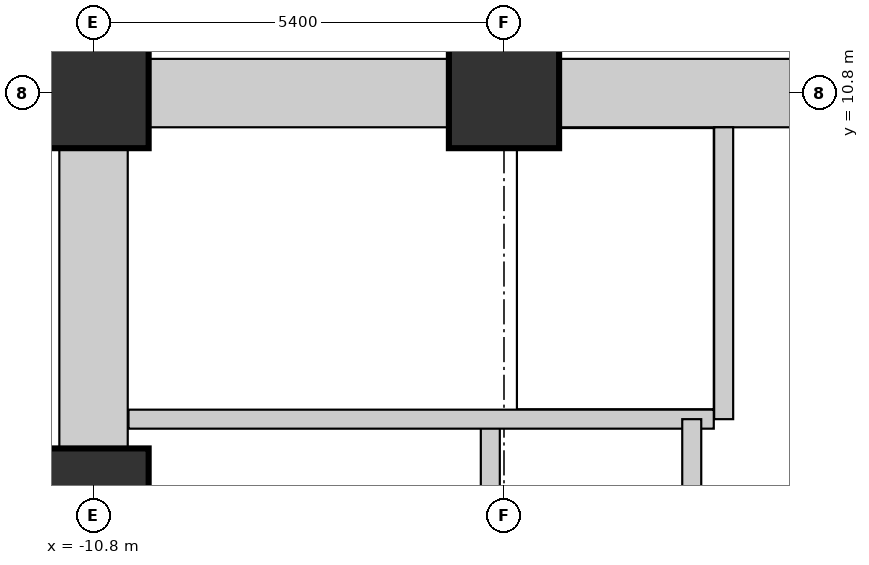
"""IFC4 building model, lengths in metres.
Left out: names, types, materials, properties, quantities, classifications, styles, units other than length and angle.
Written with IfcOpenShell. Run it as: python <this file> out.ifc"""

import sys

from ifc_helpers import new_model, si_unit, direction, frame, frame_2d, origin, origin_2d, place, context, subcontext, project, spatial, rectangle, extrude, element, fill, save


model = new_model("IFC4")
c1 = context("Model", 3, precision=1e-05, world=origin(), true_north=direction((0.0, 1.0)))
c2 = subcontext(c1, "Body", "Model", "MODEL_VIEW")
j1 = project(units=[si_unit("LENGTHUNIT", "METRE"), si_unit("PLANEANGLEUNIT", "RADIAN")], contexts=[c1])
p1 = place(None, origin())
s1 = spatial("IfcSite", under=j1, at=p1, CompositionType="ELEMENT")
p2 = place(p1, origin())
s2 = spatial("IfcBuilding", under=s1, at=p2, CompositionType="ELEMENT")
p3 = place(p2, frame((0.0, 0.0, 9.0)))
s3 = spatial("IfcBuildingStorey", under=s2, at=p3, CompositionType="ELEMENT", Elevation=9.0)
for number, where, z_axis, x_axis in (
    (1, (-10.8, 5.4, 0.0), (0.0, 0.0, 1.0), (1.0, 0.0, 0.0)),
    (2, (-10.8, 10.8, 0.0), (0.0, 0.0, 1.0), (1.0, 0.0, 0.0)),
    (3, (-5.4, 10.8, 0.0), (0.0, 0.0, 1.0), (1.0, 0.0, 0.0)),
):
    element("IfcColumn", number, at=place(p3, frame(where, z_axis=z_axis, x_axis=x_axis)), inside=s3, PredefinedType="COLUMN", context=c2, shape_type="SweptSolid", body=[
        extrude(rectangle(XDim=1.45, YDim=1.45, at=origin_2d()), origin(), (0.0, 0.0, 1.0), 4.5),
    ])
p4 = place(p3, frame((-10.065, 10.8, 0.0), z_axis=(0.0, 0.0, 1.0), x_axis=(1.0, 0.0, 0.0)))
e4 = element("IfcWall", 4, at=p4, inside=s3, PredefinedType="SHEAR", context=c2, shape_type="SweptSolid", body=[
    extrude(rectangle(XDim=3.93, YDim=0.9, at=frame_2d((1.965, 0.0))), origin(), (0.0, 0.0, 1.0), 4.5),
])
p5 = place(p3, frame((-4.665, 10.8, 0.0), z_axis=(0.0, 0.0, 1.0), x_axis=(1.0, 0.0, 0.0)))
e5 = element("IfcWall", 5, at=p5, inside=s3, PredefinedType="SHEAR", context=c2, shape_type="SweptSolid", body=[
    extrude(rectangle(XDim=3.93, YDim=0.9, at=frame_2d((1.965, 0.0))), origin(), (0.0, 0.0, 1.0), 4.5),
])
p6 = place(p5, frame((2.58, 0.0, 0.0)))
e6 = element("IfcOpeningElement", 6, at=p6, cuts=e5, PredefinedType="OPENING", context=c2, shape_type="SweptSolid", body=[
    extrude(rectangle(XDim=1.1, YDim=2.1, at=frame_2d((0.55, 1.05))), frame((0.0, 0.46, 0.0), z_axis=(0.0, -1.0, 0.0), x_axis=(1.0, 0.0, 0.0)), (0.0, 0.0, 1.0), 0.92),
])
p7 = place(p3, frame((-10.8, 6.135, 0.0), z_axis=(0.0, 0.0, 1.0), x_axis=(0.0, 1.0, 0.0)))
e7 = element("IfcWall", 7, at=p7, inside=s3, PredefinedType="SHEAR", context=c2, shape_type="SweptSolid", body=[
    extrude(rectangle(XDim=3.93, YDim=0.9, at=frame_2d((1.965, 0.0))), origin(), (0.0, 0.0, 1.0), 4.5),
])
p8 = place(p3, frame((-5.58, 0.72, 0.0), z_axis=(0.0, 0.0, 1.0), x_axis=(0.0, 1.0, 0.0)))
e8 = element("IfcWall", 8, at=p8, inside=s3, PredefinedType="SHEAR", context=c2, shape_type="SweptSolid", body=[
    extrude(rectangle(XDim=5.79, YDim=0.25, at=frame_2d((2.895, 0.0))), origin(), (0.0, 0.0, 1.0), 4.5),
])
p9 = place(p8, frame((3.35, 0.0, 0.0)))
e9 = element("IfcOpeningElement", 9, at=p9, cuts=e8, PredefinedType="OPENING", context=c2, shape_type="SweptSolid", body=[
    extrude(rectangle(XDim=1.1, YDim=2.1, at=frame_2d((0.55, 1.05))), frame((0.0, 0.135, 0.0), z_axis=(0.0, -1.0, 0.0), x_axis=(1.0, 0.0, 0.0)), (0.0, 0.0, 1.0), 0.27),
])
p10 = place(p3, frame((-2.51, 6.51, 0.0), z_axis=(0.0, 0.0, 1.0), x_axis=(0.0, 1.0, 0.0)))
e10 = element("IfcWall", 10, at=p10, inside=s3, PredefinedType="SHEAR", context=c2, shape_type="SweptSolid", body=[
    extrude(rectangle(XDim=3.84, YDim=0.25, at=frame_2d((1.92, 0.0))), origin(), (0.0, 0.0, 1.0), 4.5),
])
p11 = place(p3, frame((-10.34, 6.51, 0.0), z_axis=(0.0, 0.0, 1.0), x_axis=(1.0, 0.0, 0.0)))
e11 = element("IfcWall", 11, at=p11, inside=s3, PredefinedType="SHEAR", context=c2, shape_type="SweptSolid", body=[
    extrude(rectangle(XDim=7.7, YDim=0.25, at=frame_2d((3.85, 0.0))), origin(), (0.0, 0.0, 1.0), 4.5),
])
p12 = place(p11, frame((0.35, 0.0, 0.0)))
e12 = element("IfcOpeningElement", 12, at=p12, cuts=e11, PredefinedType="OPENING", context=c2, shape_type="SweptSolid", body=[
    extrude(rectangle(XDim=1.1, YDim=2.1, at=frame_2d((0.55, 1.05))), frame((0.0, 0.135, 0.0), z_axis=(0.0, -1.0, 0.0), x_axis=(1.0, 0.0, 0.0)), (0.0, 0.0, 1.0), 0.27),
])
p13 = place(p3, frame((-2.93, 0.68, 0.0), z_axis=(0.0, 0.0, 1.0), x_axis=(0.0, 1.0, 0.0)))
e13 = element("IfcWall", 13, at=p13, inside=s3, PredefinedType="SHEAR", context=c2, shape_type="SweptSolid", body=[
    extrude(rectangle(XDim=5.83, YDim=0.25, at=frame_2d((2.915, 0.0))), origin(), (0.0, 0.0, 1.0), 4.5),
])
p14 = place(p13, frame((0.75, 0.0, 0.0)))
e14 = element("IfcOpeningElement", 14, at=p14, cuts=e13, PredefinedType="OPENING", context=c2, shape_type="SweptSolid", body=[
    extrude(rectangle(XDim=1.2, YDim=2.1, at=frame_2d((0.6, 1.05))), frame((0.0, 0.135, 0.0), z_axis=(0.0, -1.0, 0.0), x_axis=(1.0, 0.0, 0.0)), (0.0, 0.0, 1.0), 0.27),
])
p15 = place(p12, origin())
e15 = element("IfcDoor", 15, at=p15, inside=s3, OperationType="SINGLE_SWING_LEFT", PredefinedType="DOOR", context=c2, shape_type="SweptSolid", body=[
    extrude(rectangle(XDim=1.1, YDim=2.1, at=frame_2d((0.55, 1.05))), frame((0.0, 0.025, 0.0), z_axis=(0.0, -1.0, 0.0), x_axis=(1.0, 0.0, 0.0)), (0.0, 0.0, 1.0), 0.05),
])
fill(e12, e15)
p16 = place(p6, origin())
e16 = element("IfcDoor", 16, at=p16, inside=s3, OperationType="SINGLE_SWING_LEFT", PredefinedType="DOOR", context=c2, shape_type="SweptSolid", body=[
    extrude(rectangle(XDim=1.1, YDim=2.1, at=frame_2d((0.55, 1.05))), frame((0.0, 0.025, 0.0), z_axis=(0.0, -1.0, 0.0), x_axis=(1.0, 0.0, 0.0)), (0.0, 0.0, 1.0), 0.05),
])
fill(e6, e16)
save(model, sys.argv[1])
